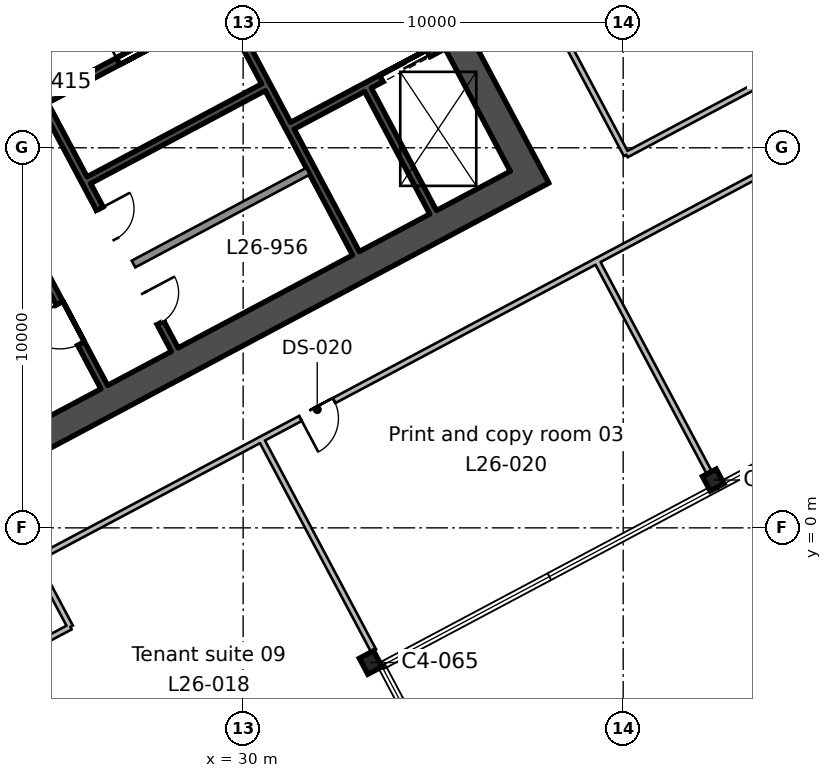
"""IFC4 building model, lengths in metres.
Left out: names, types, materials, properties, quantities, classifications, styles, units other than length and angle.
Written with IfcOpenShell. Run it as: python <this file> out.ifc"""

import sys

from ifc_helpers import new_model, si_unit, direction, frame, frame_2d, origin, origin_2d, place, context, subcontext, project, spatial, rectangle, i_section, extrude, element, fill, save


model = new_model("IFC4")
c1 = context("Model", 3, precision=1e-05, world=origin(), true_north=direction((0.0, 1.0)))
c2 = subcontext(c1, "Body", "Model", "MODEL_VIEW")
j1 = project(units=[si_unit("LENGTHUNIT", "METRE"), si_unit("PLANEANGLEUNIT", "RADIAN")], contexts=[c1])
p1 = place(None, origin())
s1 = spatial("IfcSite", under=j1, at=p1, CompositionType="ELEMENT")
p2 = place(p1, origin())
s2 = spatial("IfcBuilding", under=s1, at=p2, CompositionType="ELEMENT")
p3 = place(p2, frame((0.0, 0.0, 130.2)))
s3 = spatial("IfcBuildingStorey", under=s2, at=p3, CompositionType="ELEMENT", Elevation=130.2)
p4 = place(p3, frame((33.356, -3.543, 0.0), z_axis=(0.0, 0.0, 1.0), x_axis=(0.882947592859, 0.469471562786, 0.0)))
e1 = element("IfcColumn", 1, at=p4, inside=s3, PredefinedType="COLUMN", context=c2, shape_type="SweptSolid", body=[
    extrude(i_section(OverallWidth=0.424, OverallDepth=0.475, WebThickness=0.048, FlangeThickness=0.077, FilletRadius=0.015, at=origin_2d()), origin(), (0.0, 0.0, 1.0), 4.0),
])
p5 = place(p3, frame((42.369, 1.258, 0.0), z_axis=(0.0, 0.0, 1.0), x_axis=(0.882947592859, 0.469471562786, 0.0)))
e2 = element("IfcColumn", 2, at=p5, inside=s3, PredefinedType="COLUMN", context=c2, shape_type="SweptSolid", body=[
    extrude(i_section(OverallWidth=0.412, OverallDepth=0.434, WebThickness=0.036, FlangeThickness=0.057, FilletRadius=0.015, at=origin_2d()), origin(), (0.0, 0.0, 1.0), 4.0),
])
p6 = place(p3, frame((37.713, 8.896, 0.0), z_axis=(0.0, 0.0, 1.0), x_axis=(-0.469469918705, 0.88294846703, 0.0)))
e3 = element("IfcWall", 3, at=p6, inside=s3, PredefinedType="SHEAR", context=c2, shape_type="SweptSolid", body=[
    extrude(rectangle(XDim=19.7, YDim=0.75, at=frame_2d((9.85, 0.0))), origin(), (0.0, 0.0, 1.0), 4.0),
])
p7 = place(p6, frame((10.45, 0.0, 0.0)))
e4 = element("IfcOpeningElement", 4, at=p7, cuts=e3, PredefinedType="OPENING", context=c2, shape_type="SweptSolid", body=[
    extrude(rectangle(XDim=2.4, YDim=2.4, at=frame_2d((1.2, 1.2))), frame((0.0, 0.385, 0.0), z_axis=(0.0, -1.0, 0.0), x_axis=(1.0, 0.0, 0.0)), (0.0, 0.0, 1.0), 0.77),
])
p8 = place(p3, frame((19.37, -0.432, 0.0), z_axis=(0.0, 0.0, 1.0), x_axis=(0.88294509198, 0.469476266226, 0.0)))
e5 = element("IfcWall", 5, at=p8, inside=s3, PredefinedType="SHEAR", context=c2, shape_type="SweptSolid", body=[
    extrude(rectangle(XDim=20.2, YDim=0.75, at=frame_2d((10.1, 0.0))), origin(), (0.0, 0.0, 1.0), 4.0),
])
p9 = place(p3, frame((26.346, 3.702, 0.0), z_axis=(0.0, 0.0, 1.0), x_axis=(-0.469480409012, 0.88294288918, 0.0)))
e6 = element("IfcWall", 6, at=p9, inside=s3, PredefinedType="SHEAR", context=c2, shape_type="SweptSolid", body=[
    extrude(rectangle(XDim=7.3, YDim=0.2, at=frame_2d((3.65, 0.0))), origin(), (0.0, 0.0, 1.0), 4.0),
])
p10 = place(p9, frame((1.3, 0.0, 0.0)))
e7 = element("IfcOpeningElement", 7, at=p10, cuts=e6, PredefinedType="OPENING", context=c2, shape_type="SweptSolid", body=[
    extrude(rectangle(XDim=1.2, YDim=2.1, at=frame_2d((0.6, 1.05))), frame((0.0, 0.11, 0.0), z_axis=(0.0, -1.0, 0.0), x_axis=(1.0, 0.0, 0.0)), (0.0, 0.0, 1.0), 0.22),
])
p11 = place(p3, frame((28.2, 4.688, 0.0), z_axis=(0.0, 0.0, 1.0), x_axis=(-0.469454336211, 0.882956752176, 0.0)))
e8 = element("IfcWall", 8, at=p11, inside=s3, PredefinedType="SHEAR", context=c2, shape_type="SweptSolid", body=[
    extrude(rectangle(XDim=7.3, YDim=0.2, at=frame_2d((3.65, 0.0))), origin(), (0.0, 0.0, 1.0), 4.0),
])
p12 = place(p11, frame((0.8, 0.0, 0.0)))
e9 = element("IfcOpeningElement", 9, at=p12, cuts=e8, PredefinedType="OPENING", context=c2, shape_type="SweptSolid", body=[
    extrude(rectangle(XDim=0.9, YDim=2.1, at=frame_2d((0.45, 1.05))), frame((0.0, 0.11, 0.0), z_axis=(0.0, -1.0, 0.0), x_axis=(1.0, 0.0, 0.0)), (0.0, 0.0, 1.0), 0.22),
])
p13 = place(p11, frame((3.3, 0.0, 0.0)))
e10 = element("IfcOpeningElement", 10, at=p13, cuts=e8, PredefinedType="OPENING", context=c2, shape_type="SweptSolid", body=[
    extrude(rectangle(XDim=0.9, YDim=2.1, at=frame_2d((0.45, 1.05))), frame((0.0, 0.11, 0.0), z_axis=(0.0, -1.0, 0.0), x_axis=(1.0, 0.0, 0.0)), (0.0, 0.0, 1.0), 0.22),
])
p14 = place(p3, frame((32.968, 7.223, 0.0), z_axis=(0.0, 0.0, 1.0), x_axis=(-0.469480409012, 0.88294288918, 0.0)))
e11 = element("IfcWall", 11, at=p14, inside=s3, PredefinedType="SHEAR", context=c2, shape_type="SweptSolid", body=[
    extrude(rectangle(XDim=7.3, YDim=0.2, at=frame_2d((3.65, 0.0))), origin(), (0.0, 0.0, 1.0), 4.0),
])
p15 = place(p3, frame((34.999, 8.303, 0.0), z_axis=(0.0, 0.0, 1.0), x_axis=(-0.4694665462, 0.882950260207, 0.0)))
e12 = element("IfcWall", 12, at=p15, inside=s3, PredefinedType="SHEAR", context=c2, shape_type="SweptSolid", body=[
    extrude(rectangle(XDim=3.65, YDim=0.2, at=frame_2d((1.825, 0.0))), origin(), (0.0, 0.0, 1.0), 4.0),
])
p16 = place(p3, frame((27.115, 6.942, 0.0), z_axis=(0.0, 0.0, 1.0), x_axis=(0.882934506056, 0.469496174655, 0.0)))
e13 = element("IfcWall", 13, at=p16, inside=s3, PredefinedType="SOLIDWALL", context=c2, shape_type="SweptSolid", body=[
    extrude(rectangle(XDim=5.2, YDim=0.2, at=frame_2d((2.6, 0.0))), origin(), (0.0, 0.0, 1.0), 4.0),
])
p17 = place(p3, frame((31.296, 10.581, 0.0), z_axis=(0.0, 0.0, 1.0), x_axis=(0.882960433586, 0.469447412093, 0.0)))
e14 = element("IfcWall", 14, at=p17, inside=s3, PredefinedType="SHEAR", context=c2, shape_type="SweptSolid", body=[
    extrude(rectangle(XDim=4.5, YDim=0.2, at=frame_2d((2.25, 0.0))), origin(), (0.0, 0.0, 1.0), 4.0),
])
p18 = place(p17, frame((2.65, 0.0, 0.0)))
e15 = element("IfcOpeningElement", 15, at=p18, cuts=e14, PredefinedType="OPENING", context=c2, shape_type="SweptSolid", body=[
    extrude(rectangle(XDim=1.4, YDim=2.4, at=frame_2d((0.7, 1.2))), frame((0.0, 0.11, 0.0), z_axis=(0.0, -1.0, 0.0), x_axis=(1.0, 0.0, 0.0)), (0.0, 0.0, 1.0), 0.22),
])
p19 = place(p3, frame((25.941, 9.15, 0.0), z_axis=(0.0, 0.0, 1.0), x_axis=(0.882953967957, 0.469459572775, 0.0)))
e16 = element("IfcWall", 16, at=p19, inside=s3, PredefinedType="SHEAR", context=c2, shape_type="SweptSolid", body=[
    extrude(rectangle(XDim=5.2, YDim=0.2, at=frame_2d((2.6, 0.0))), origin(), (0.0, 0.0, 1.0), 4.0),
])
p20 = place(p3, frame((24.726, 11.222, 0.0), z_axis=(0.0, 0.0, 1.0), x_axis=(0.882940221191, 0.469485426614, 0.0)))
e17 = element("IfcWall", 17, at=p20, inside=s3, PredefinedType="SHEAR", context=c2, shape_type="SweptSolid", body=[
    extrude(rectangle(XDim=10.0, YDim=0.2, at=frame_2d((5.0, 0.0))), origin(), (0.0, 0.0, 1.0), 4.0),
])
p21 = place(p20, frame((6.3, 0.0, 0.0)))
e18 = element("IfcOpeningElement", 18, at=p21, cuts=e17, PredefinedType="OPENING", context=c2, shape_type="SweptSolid", body=[
    extrude(rectangle(XDim=1.2, YDim=2.1, at=frame_2d((0.6, 1.05))), frame((0.0, 0.11, 0.0), z_axis=(0.0, -1.0, 0.0), x_axis=(1.0, 0.0, 0.0)), (0.0, 0.0, 1.0), 0.22),
])
p22 = place(p20, frame((2.25, 0.0, 0.0)))
e19 = element("IfcOpeningElement", 19, at=p22, cuts=e17, PredefinedType="OPENING", context=c2, shape_type="SweptSolid", body=[
    extrude(rectangle(XDim=0.9, YDim=2.1, at=frame_2d((0.45, 1.05))), frame((0.0, 0.11, 0.0), z_axis=(0.0, -1.0, 0.0), x_axis=(1.0, 0.0, 0.0)), (0.0, 0.0, 1.0), 0.22),
])
p23 = place(p3, frame((24.515, -0.842, 0.0), z_axis=(0.0, 0.0, 1.0), x_axis=(0.469509609091, -0.882927362228, 0.0)))
e20 = element("IfcWall", 20, at=p23, inside=s3, PredefinedType="PARTITIONING", context=c2, shape_type="SweptSolid", body=[
    extrude(rectangle(XDim=1.998, YDim=0.15, at=frame_2d((0.999, 0.0))), origin(), (0.0, 0.0, 1.0), 3.64),
])
p24 = place(p3, frame((25.453, -2.606, 0.0), z_axis=(0.0, 0.0, 1.0), x_axis=(-0.882948296906, -0.469470238663, 0.0)))
e21 = element("IfcWall", 21, at=p24, inside=s3, PredefinedType="PARTITIONING", context=c2, shape_type="SweptSolid", body=[
    extrude(rectangle(XDim=7.064, YDim=0.15, at=frame_2d((3.532, 0.0))), origin(), (0.0, 0.0, 1.0), 3.64),
])
p25 = place(p3, frame((30.474, 2.329, 0.0), z_axis=(0.0, 0.0, 1.0), x_axis=(0.469455518244, -0.882956123706, 0.0)))
e22 = element("IfcWall", 22, at=p25, inside=s3, PredefinedType="PARTITIONING", context=c2, shape_type="SweptSolid", body=[
    extrude(rectangle(XDim=6.3, YDim=0.15, at=frame_2d((3.15, 0.0))), origin(), (0.0, 0.0, 1.0), 3.64),
])
p26 = place(p3, frame((39.321, 7.034, 0.0), z_axis=(0.0, 0.0, 1.0), x_axis=(-0.88292452231, -0.469514949605, 0.0)))
e23 = element("IfcWall", 23, at=p26, inside=s3, PredefinedType="PARTITIONING", context=c2, shape_type="SweptSolid", body=[
    extrude(rectangle(XDim=16.771, YDim=0.15, at=frame_2d((8.385, 0.0))), origin(), (0.0, 0.0, 1.0), 3.64),
])
p27 = place(p26, frame((7.849, 0.0, 0.0)))
e24 = element("IfcOpeningElement", 24, at=p27, cuts=e23, PredefinedType="OPENING", context=c2, shape_type="SweptSolid", body=[
    extrude(rectangle(XDim=1.0, YDim=2.1, at=frame_2d((0.5, 1.05))), frame((0.0, 0.085, 0.0), z_axis=(0.0, -1.0, 0.0), x_axis=(1.0, 0.0, 0.0)), (0.0, 0.0, 1.0), 0.17),
])
p28 = place(p3, frame((46.396, 13.174, 0.0), z_axis=(0.0, 0.0, 1.0), x_axis=(-0.882918469701, -0.469526331381, 0.0)))
e25 = element("IfcWall", 25, at=p28, inside=s3, PredefinedType="PARTITIONING", context=c2, shape_type="SweptSolid", body=[
    extrude(rectangle(XDim=7.15, YDim=0.15, at=frame_2d((3.575, 0.0))), origin(), (0.0, 0.0, 1.0), 3.64),
])
p29 = place(p3, frame((40.083, 9.817, 0.0), z_axis=(0.0, 0.0, 1.0), x_axis=(-0.469455368788, 0.88295620317, 0.0)))
e26 = element("IfcWall", 26, at=p29, inside=s3, PredefinedType="PARTITIONING", context=c2, shape_type="SweptSolid", body=[
    extrude(rectangle(XDim=22.3, YDim=0.15, at=frame_2d((11.15, 0.0))), origin(), (0.0, 0.0, 1.0), 3.64),
])
p30 = place(p3, frame((39.303, 7.024, 0.0), z_axis=(0.0, 0.0, 1.0), x_axis=(0.469333338233, -0.88302107428, 0.0)))
e27 = element("IfcWall", 27, at=p30, inside=s3, PredefinedType="PARTITIONING", context=c2, shape_type="SweptSolid", body=[
    extrude(rectangle(XDim=6.313, YDim=0.15, at=frame_2d((3.157, 0.0))), origin(), (0.0, 0.0, 1.0), 3.64),
])
p31 = place(p3, frame((39.321, 7.034, 0.0), z_axis=(0.0, 0.0, 1.0), x_axis=(0.882945641188, 0.469475233326, 0.0)))
e28 = element("IfcWall", 28, at=p31, inside=s3, PredefinedType="PARTITIONING", context=c2, shape_type="SweptSolid", body=[
    extrude(rectangle(XDim=11.229, YDim=0.15, at=frame_2d((5.615, 0.0))), origin(), (0.0, 0.0, 1.0), 3.64),
])
p32 = place(p31, frame((4.751, 0.0, 0.0)))
e29 = element("IfcOpeningElement", 29, at=p32, cuts=e28, PredefinedType="OPENING", context=c2, shape_type="SweptSolid", body=[
    extrude(rectangle(XDim=1.8, YDim=2.1, at=frame_2d((0.9, 1.05))), frame((0.0, 0.085, 0.0), z_axis=(0.0, -1.0, 0.0), x_axis=(1.0, 0.0, 0.0)), (0.0, 0.0, 1.0), 0.17),
])
p33 = place(p3, frame((38.483, 32.529, 0.0), z_axis=(0.0, 0.0, 1.0), x_axis=(0.469465364691, -0.882950888416, 0.0)))
e30 = element("IfcWall", 30, at=p33, inside=s3, PredefinedType="PARTITIONING", context=c2, shape_type="SweptSolid", body=[
    extrude(rectangle(XDim=22.905, YDim=0.15, at=frame_2d((11.453, 0.0))), origin(), (0.0, 0.0, 1.0), 3.64),
])
p34 = place(p10, origin())
e31 = element("IfcDoor", 31, at=p34, inside=s3, OperationType="SINGLE_SWING_RIGHT", PredefinedType="DOOR", context=c2, shape_type="SweptSolid", body=[
    extrude(rectangle(XDim=1.2, YDim=2.1, at=frame_2d((0.6, 1.05))), frame((0.0, 0.025, 0.0), z_axis=(0.0, -1.0, 0.0), x_axis=(1.0, 0.0, 0.0)), (0.0, 0.0, 1.0), 0.05),
])
fill(e7, e31)
p35 = place(p22, origin())
e32 = element("IfcDoor", 32, at=p35, inside=s3, OperationType="SINGLE_SWING_LEFT", PredefinedType="DOOR", context=c2, shape_type="SweptSolid", body=[
    extrude(rectangle(XDim=0.9, YDim=2.1, at=frame_2d((0.45, 1.05))), frame((0.0, 0.025, 0.0), z_axis=(0.0, -1.0, 0.0), x_axis=(1.0, 0.0, 0.0)), (0.0, 0.0, 1.0), 0.05),
])
fill(e19, e32)
p36 = place(p18, origin())
e33 = element("IfcDoor", 33, at=p36, inside=s3, OperationType="DOUBLE_DOOR_SLIDING", PredefinedType="DOOR", context=c2, shape_type="SweptSolid", body=[
    extrude(rectangle(XDim=1.4, YDim=2.4, at=frame_2d((0.7, 1.2))), frame((0.0, 0.025, 0.0), z_axis=(0.0, -1.0, 0.0), x_axis=(1.0, 0.0, 0.0)), (0.0, 0.0, 1.0), 0.05),
])
fill(e15, e33)
p37 = place(p12, frame((0.9, 0.0, 0.0), z_axis=(0.0, 0.0, 1.0), x_axis=(-1.0, 0.0, 0.0)))
e34 = element("IfcDoor", 34, at=p37, inside=s3, OperationType="SINGLE_SWING_LEFT", PredefinedType="DOOR", context=c2, shape_type="SweptSolid", body=[
    extrude(rectangle(XDim=0.9, YDim=2.1, at=frame_2d((0.45, 1.05))), frame((0.0, 0.025, 0.0), z_axis=(0.0, -1.0, 0.0), x_axis=(1.0, 0.0, 0.0)), (0.0, 0.0, 1.0), 0.05),
])
fill(e9, e34)
p38 = place(p13, frame((0.9, 0.0, 0.0), z_axis=(0.0, 0.0, 1.0), x_axis=(-1.0, 0.0, 0.0)))
e35 = element("IfcDoor", 35, at=p38, inside=s3, OperationType="SINGLE_SWING_LEFT", PredefinedType="DOOR", context=c2, shape_type="SweptSolid", body=[
    extrude(rectangle(XDim=0.9, YDim=2.1, at=frame_2d((0.45, 1.05))), frame((0.0, 0.025, 0.0), z_axis=(0.0, -1.0, 0.0), x_axis=(1.0, 0.0, 0.0)), (0.0, 0.0, 1.0), 0.05),
])
fill(e10, e35)
p39 = place(p27, origin())
e36 = element("IfcDoor", 36, at=p39, inside=s3, OperationType="SINGLE_SWING_RIGHT", PredefinedType="DOOR", context=c2, shape_type="SweptSolid", body=[
    extrude(rectangle(XDim=1.0, YDim=2.1, at=frame_2d((0.5, 1.05))), frame((0.0, 0.025, 0.0), z_axis=(0.0, -1.0, 0.0), x_axis=(1.0, 0.0, 0.0)), (0.0, 0.0, 1.0), 0.05),
])
fill(e24, e36)
save(model, sys.argv[1])
